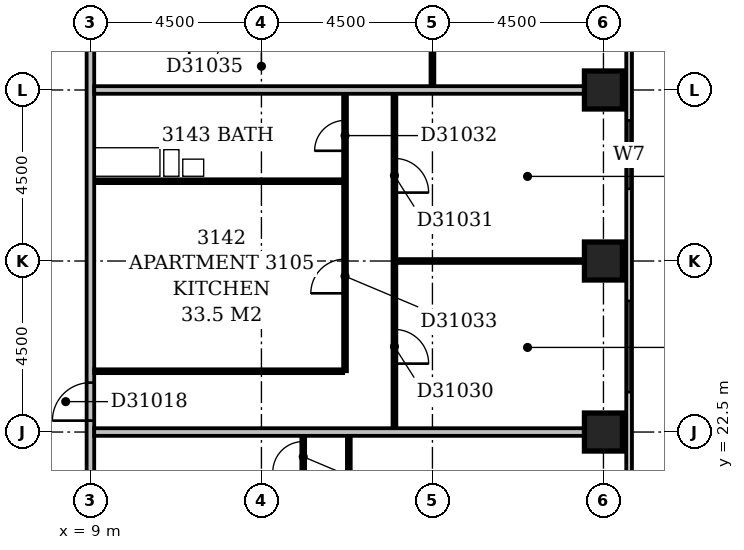
"""IFC4 building model, lengths in metres.
Left out: names, types, materials, properties, quantities, classifications, styles, units other than length and angle.
Written with IfcOpenShell. Run it as: python <this file> out.ifc"""

import sys

from ifc_helpers import new_model, si_unit, direction, frame, frame_2d, origin, origin_2d, place, context, subcontext, project, spatial, rectangle, extrude, element, fill, save


model = new_model("IFC4")
c1 = context("Model", 3, precision=1e-05, world=origin(), true_north=direction((0.0, 1.0)))
c2 = subcontext(c1, "Body", "Model", "MODEL_VIEW")
j1 = project(units=[si_unit("LENGTHUNIT", "METRE"), si_unit("PLANEANGLEUNIT", "RADIAN")], contexts=[c1])
p1 = place(None, origin())
s1 = spatial("IfcSite", under=j1, at=p1, CompositionType="ELEMENT")
p2 = place(p1, origin())
s2 = spatial("IfcBuilding", under=s1, at=p2, CompositionType="ELEMENT")
p3 = place(p2, frame((0.0, 0.0, 126.8)))
s3 = spatial("IfcBuildingStorey", under=s2, at=p3, CompositionType="ELEMENT", Elevation=126.8)
for number, where, z_axis, x_axis in (
    (1, (22.5, 22.5, -0.3), (0.0, 0.0, 1.0), (1.0, 0.0, 0.0)),
    (2, (22.5, 27.0, -0.3), (0.0, 0.0, 1.0), (1.0, 0.0, 0.0)),
    (3, (22.5, 31.5, -0.3), (0.0, 0.0, 1.0), (1.0, 0.0, 0.0)),
):
    element("IfcColumn", number, at=place(p3, frame(where, z_axis=z_axis, x_axis=x_axis)), inside=s3, PredefinedType="COLUMN", context=c2, shape_type="SweptSolid", body=[
        extrude(rectangle(XDim=1.0, YDim=1.0, at=origin_2d()), origin(), (0.0, 0.0, 1.0), 3.6),
    ])
p4 = place(p3, frame((23.175, 17.4, 0.0), z_axis=(0.0, 0.0, 1.0), x_axis=(0.0, 1.0, 0.0)))
e4 = element("IfcWall", 4, at=p4, inside=s3, PredefinedType="STANDARD", context=c2, shape_type="SweptSolid", body=[
    extrude(rectangle(XDim=17.85, YDim=0.15, at=frame_2d((8.925, 0.0))), origin(), (0.0, 0.0, 1.0), 2.7),
])
p5 = place(p4, frame((1.65, 0.0, 0.6)))
e5 = element("IfcOpeningElement", 5, at=p5, cuts=e4, PredefinedType="OPENING", context=c2, shape_type="SweptSolid", body=[
    extrude(rectangle(XDim=2.4, YDim=1.8, at=frame_2d((1.2, 0.9))), frame((0.0, 0.087, 0.0), z_axis=(0.0, -1.0, 0.0), x_axis=(1.0, 0.0, 0.0)), (0.0, 0.0, 1.0), 0.174),
])
p6 = place(p4, frame((6.15, 0.0, 0.6)))
e6 = element("IfcOpeningElement", 6, at=p6, cuts=e4, PredefinedType="OPENING", context=c2, shape_type="SweptSolid", body=[
    extrude(rectangle(XDim=2.4, YDim=1.8, at=frame_2d((1.2, 0.9))), frame((0.0, 0.087, 0.0), z_axis=(0.0, -1.0, 0.0), x_axis=(1.0, 0.0, 0.0)), (0.0, 0.0, 1.0), 0.174),
])
p7 = place(p4, frame((11.498, 0.0, 0.6)))
e7 = element("IfcOpeningElement", 7, at=p7, cuts=e4, PredefinedType="OPENING", context=c2, shape_type="SweptSolid", body=[
    extrude(rectangle(XDim=1.8, YDim=1.8, at=frame_2d((0.9, 0.9))), frame((0.0, 0.087, 0.0), z_axis=(0.0, -1.0, 0.0), x_axis=(1.0, 0.0, 0.0)), (0.0, 0.0, 1.0), 0.174),
])
p8 = place(p4, frame((15.15, 0.0, 0.6)))
e8 = element("IfcOpeningElement", 8, at=p8, cuts=e4, PredefinedType="OPENING", context=c2, shape_type="SweptSolid", body=[
    extrude(rectangle(XDim=2.4, YDim=1.8, at=frame_2d((1.2, 0.9))), frame((0.0, 0.087, 0.0), z_axis=(0.0, -1.0, 0.0), x_axis=(1.0, 0.0, 0.0)), (0.0, 0.0, 1.0), 0.174),
])
p9 = place(p3, frame((9.0, 5.0, 0.0), z_axis=(0.0, 0.0, 1.0), x_axis=(0.0, 1.0, 0.0)))
e9 = element("IfcWall", 9, at=p9, inside=s3, PredefinedType="PARTITIONING", context=c2, shape_type="SweptSolid", body=[
    extrude(rectangle(XDim=27.75, YDim=0.2, at=frame_2d((13.875, 0.0))), origin(), (0.0, 0.0, 1.0), 3.3),
])
p10 = place(p9, frame((17.8, 0.0, 0.0)))
e10 = element("IfcOpeningElement", 10, at=p10, cuts=e9, PredefinedType="OPENING", context=c2, shape_type="SweptSolid", body=[
    extrude(rectangle(XDim=1.0, YDim=2.1, at=frame_2d((0.5, 1.05))), frame((0.0, 0.112, 0.0), z_axis=(0.0, -1.0, 0.0), x_axis=(1.0, 0.0, 0.0)), (0.0, 0.0, 1.0), 0.224),
])
p11 = place(p9, frame((14.95, 0.0, 0.0)))
e11 = element("IfcOpeningElement", 11, at=p11, cuts=e9, PredefinedType="OPENING", context=c2, shape_type="SweptSolid", body=[
    extrude(rectangle(XDim=1.0, YDim=2.1, at=frame_2d((0.5, 1.05))), frame((0.0, 0.112, 0.0), z_axis=(0.0, -1.0, 0.0), x_axis=(1.0, 0.0, 0.0)), (0.0, 0.0, 1.0), 0.224),
])
p12 = place(p9, frame((9.3, 0.0, 0.0)))
e12 = element("IfcOpeningElement", 12, at=p12, cuts=e9, PredefinedType="OPENING", context=c2, shape_type="SweptSolid", body=[
    extrude(rectangle(XDim=1.0, YDim=2.1, at=frame_2d((0.5, 1.05))), frame((0.0, 0.112, 0.0), z_axis=(0.0, -1.0, 0.0), x_axis=(1.0, 0.0, 0.0)), (0.0, 0.0, 1.0), 0.224),
])
p13 = place(p9, frame((1.5, 0.0, 0.0)))
e13 = element("IfcOpeningElement", 13, at=p13, cuts=e9, PredefinedType="OPENING", context=c2, shape_type="SweptSolid", body=[
    extrude(rectangle(XDim=0.9, YDim=2.1, at=frame_2d((0.45, 1.05))), frame((0.0, 0.112, 0.0), z_axis=(0.0, -1.0, 0.0), x_axis=(1.0, 0.0, 0.0)), (0.0, 0.0, 1.0), 0.224),
])
p14 = place(p3, frame((15.8, 18.1, 0.0), z_axis=(0.0, 0.0, 1.0), x_axis=(0.0, 1.0, 0.0)))
e14 = element("IfcWall", 14, at=p14, inside=s3, PredefinedType="PARTITIONING", context=c2, shape_type="SweptSolid", body=[
    extrude(rectangle(XDim=4.3, YDim=0.1, at=frame_2d((2.15, 0.0))), origin(), (0.0, 0.0, 1.0), 3.3),
])
p15 = place(p14, frame((1.7, 0.0, 0.0)))
e15 = element("IfcOpeningElement", 15, at=p15, cuts=e14, PredefinedType="OPENING", context=c2, shape_type="SweptSolid", body=[
    extrude(rectangle(XDim=0.9, YDim=2.1, at=frame_2d((0.45, 1.05))), frame((0.0, 0.062, 0.0), z_axis=(0.0, -1.0, 0.0), x_axis=(1.0, 0.0, 0.0)), (0.0, 0.0, 1.0), 0.124),
])
p16 = place(p3, frame((14.6, 21.2, 0.0), z_axis=(0.0, 0.0, 1.0), x_axis=(0.0, 1.0, 0.0)))
e16 = element("IfcWall", 16, at=p16, inside=s3, PredefinedType="PARTITIONING", context=c2, shape_type="SweptSolid", body=[
    extrude(rectangle(XDim=1.2, YDim=0.1, at=frame_2d((0.6, 0.0))), origin(), (0.0, 0.0, 1.0), 3.3),
])
p17 = place(p16, frame((0.25, 0.0, 0.0)))
e17 = element("IfcOpeningElement", 17, at=p17, cuts=e16, PredefinedType="OPENING", context=c2, shape_type="SweptSolid", body=[
    extrude(rectangle(XDim=0.8, YDim=2.1, at=frame_2d((0.4, 1.05))), frame((0.0, 0.062, 0.0), z_axis=(0.0, -1.0, 0.0), x_axis=(1.0, 0.0, 0.0)), (0.0, 0.0, 1.0), 0.124),
])
p18 = place(p3, frame((9.1, 22.5, 0.0), z_axis=(0.0, 0.0, 1.0), x_axis=(1.0, 0.0, 0.0)))
e18 = element("IfcWall", 18, at=p18, inside=s3, PredefinedType="PARTITIONING", context=c2, shape_type="SweptSolid", body=[
    extrude(rectangle(XDim=12.9, YDim=0.2, at=frame_2d((6.45, 0.0))), origin(), (0.0, 0.0, 1.0), 3.3),
])
p19 = place(p3, frame((17.0, 22.6, 0.0), z_axis=(0.0, 0.0, 1.0), x_axis=(0.0, 1.0, 0.0)))
e19 = element("IfcWall", 19, at=p19, inside=s3, PredefinedType="PARTITIONING", context=c2, shape_type="SweptSolid", body=[
    extrude(rectangle(XDim=8.8, YDim=0.1, at=frame_2d((4.4, 0.0))), origin(), (0.0, 0.0, 1.0), 3.3),
])
p20 = place(p19, frame((1.7, 0.0, 0.0)))
e20 = element("IfcOpeningElement", 20, at=p20, cuts=e19, PredefinedType="OPENING", context=c2, shape_type="SweptSolid", body=[
    extrude(rectangle(XDim=0.9, YDim=2.1, at=frame_2d((0.45, 1.05))), frame((0.0, 0.062, 0.0), z_axis=(0.0, -1.0, 0.0), x_axis=(1.0, 0.0, 0.0)), (0.0, 0.0, 1.0), 0.124),
])
p21 = place(p19, frame((6.2, 0.0, 0.0)))
e21 = element("IfcOpeningElement", 21, at=p21, cuts=e19, PredefinedType="OPENING", context=c2, shape_type="SweptSolid", body=[
    extrude(rectangle(XDim=0.9, YDim=2.1, at=frame_2d((0.45, 1.05))), frame((0.0, 0.062, 0.0), z_axis=(0.0, -1.0, 0.0), x_axis=(1.0, 0.0, 0.0)), (0.0, 0.0, 1.0), 0.124),
])
p22 = place(p3, frame((9.1, 24.1, 0.0), z_axis=(0.0, 0.0, 1.0), x_axis=(1.0, 0.0, 0.0)))
e22 = element("IfcWall", 22, at=p22, inside=s3, PredefinedType="PARTITIONING", context=c2, shape_type="SweptSolid", body=[
    extrude(rectangle(XDim=6.55, YDim=0.1, at=frame_2d((3.275, 0.0))), origin(), (0.0, 0.0, 1.0), 3.3),
])
p23 = place(p3, frame((15.7, 24.1, 0.0), z_axis=(0.0, 0.0, 1.0), x_axis=(0.0, 1.0, 0.0)))
e23 = element("IfcWall", 23, at=p23, inside=s3, PredefinedType="PARTITIONING", context=c2, shape_type="SweptSolid", body=[
    extrude(rectangle(XDim=7.3, YDim=0.1, at=frame_2d((3.65, 0.0))), origin(), (0.0, 0.0, 1.0), 3.3),
])
p24 = place(p23, frame((5.8, 0.0, 0.0)))
e24 = element("IfcOpeningElement", 24, at=p24, cuts=e23, PredefinedType="OPENING", context=c2, shape_type="SweptSolid", body=[
    extrude(rectangle(XDim=0.8, YDim=2.1, at=frame_2d((0.4, 1.05))), frame((0.0, 0.062, 0.0), z_axis=(0.0, -1.0, 0.0), x_axis=(1.0, 0.0, 0.0)), (0.0, 0.0, 1.0), 0.124),
])
p25 = place(p23, frame((2.05, 0.0, 0.0)))
e25 = element("IfcOpeningElement", 25, at=p25, cuts=e23, PredefinedType="OPENING", context=c2, shape_type="SweptSolid", body=[
    extrude(rectangle(XDim=0.9, YDim=2.1, at=frame_2d((0.45, 1.05))), frame((0.0, 0.062, 0.0), z_axis=(0.0, -1.0, 0.0), x_axis=(1.0, 0.0, 0.0)), (0.0, 0.0, 1.0), 0.124),
])
p26 = place(p3, frame((17.05, 27.0, 0.0), z_axis=(0.0, 0.0, 1.0), x_axis=(1.0, 0.0, 0.0)))
e26 = element("IfcWall", 26, at=p26, inside=s3, PredefinedType="PARTITIONING", context=c2, shape_type="SweptSolid", body=[
    extrude(rectangle(XDim=4.95, YDim=0.1, at=frame_2d((2.475, 0.0))), origin(), (0.0, 0.0, 1.0), 2.7),
])
p27 = place(p3, frame((9.1, 29.1, 0.0), z_axis=(0.0, 0.0, 1.0), x_axis=(1.0, 0.0, 0.0)))
e27 = element("IfcWall", 27, at=p27, inside=s3, PredefinedType="PLUMBINGWALL", context=c2, shape_type="SweptSolid", body=[
    extrude(rectangle(XDim=6.55, YDim=0.1, at=frame_2d((3.275, 0.0))), origin(), (0.0, 0.0, 1.0), 3.3),
])
p28 = place(p3, frame((9.1, 31.5, 0.0), z_axis=(0.0, 0.0, 1.0), x_axis=(1.0, 0.0, 0.0)))
e28 = element("IfcWall", 28, at=p28, inside=s3, PredefinedType="PARTITIONING", context=c2, shape_type="SweptSolid", body=[
    extrude(rectangle(XDim=12.9, YDim=0.2, at=frame_2d((6.45, 0.0))), origin(), (0.0, 0.0, 1.0), 3.3),
])
p29 = place(p3, frame((18.0, 31.6, 0.0), z_axis=(0.0, 0.0, 1.0), x_axis=(0.0, 1.0, 0.0)))
e29 = element("IfcWall", 29, at=p29, inside=s3, PredefinedType="PARTITIONING", context=c2, shape_type="SweptSolid", body=[
    extrude(rectangle(XDim=4.3, YDim=0.1, at=frame_2d((2.15, 0.0))), origin(), (0.0, 0.0, 1.0), 3.3),
])
p30 = place(p29, frame((1.7, 0.0, 0.0)))
e30 = element("IfcOpeningElement", 30, at=p30, cuts=e29, PredefinedType="OPENING", context=c2, shape_type="SweptSolid", body=[
    extrude(rectangle(XDim=0.9, YDim=2.1, at=frame_2d((0.45, 1.05))), frame((0.0, 0.062, 0.0), z_axis=(0.0, -1.0, 0.0), x_axis=(1.0, 0.0, 0.0)), (0.0, 0.0, 1.0), 0.124),
])
p31 = place(p6, origin())
e31 = element("IfcWindow", 31, at=p31, inside=s3, PartitioningType="SINGLE_PANEL", PredefinedType="WINDOW", context=c2, shape_type="SweptSolid", body=[
    extrude(rectangle(XDim=2.4, YDim=1.8, at=frame_2d((1.2, 0.9))), frame((0.0, 0.03, 0.0), z_axis=(0.0, -1.0, 0.0), x_axis=(1.0, 0.0, 0.0)), (0.0, 0.0, 1.0), 0.06),
])
fill(e6, e31)
p32 = place(p7, origin())
e32 = element("IfcWindow", 32, at=p32, inside=s3, PartitioningType="SINGLE_PANEL", PredefinedType="WINDOW", context=c2, shape_type="SweptSolid", body=[
    extrude(rectangle(XDim=1.8, YDim=1.8, at=frame_2d((0.9, 0.9))), frame((0.0, 0.03, 0.0), z_axis=(0.0, -1.0, 0.0), x_axis=(1.0, 0.0, 0.0)), (0.0, 0.0, 1.0), 0.06),
])
fill(e7, e32)
p33 = place(p10, origin())
e33 = element("IfcDoor", 33, at=p33, inside=s3, OperationType="SINGLE_SWING_LEFT", PredefinedType="DOOR", context=c2, shape_type="SweptSolid", body=[
    extrude(rectangle(XDim=1.0, YDim=2.1, at=frame_2d((0.5, 1.05))), frame((0.0, 0.025, 0.0), z_axis=(0.0, -1.0, 0.0), x_axis=(1.0, 0.0, 0.0)), (0.0, 0.0, 1.0), 0.05),
])
fill(e10, e33)
p34 = place(p17, origin())
e34 = element("IfcDoor", 34, at=p34, inside=s3, OperationType="SINGLE_SWING_LEFT", PredefinedType="DOOR", context=c2, shape_type="SweptSolid", body=[
    extrude(rectangle(XDim=0.8, YDim=2.1, at=frame_2d((0.4, 1.05))), frame((0.0, 0.025, 0.0), z_axis=(0.0, -1.0, 0.0), x_axis=(1.0, 0.0, 0.0)), (0.0, 0.0, 1.0), 0.05),
])
fill(e17, e34)
p35 = place(p20, frame((0.9, 0.0, 0.0), z_axis=(0.0, 0.0, 1.0), x_axis=(-1.0, 0.0, 0.0)))
e35 = element("IfcDoor", 35, at=p35, inside=s3, OperationType="SINGLE_SWING_RIGHT", PredefinedType="DOOR", context=c2, shape_type="SweptSolid", body=[
    extrude(rectangle(XDim=0.9, YDim=2.1, at=frame_2d((0.45, 1.05))), frame((0.0, 0.025, 0.0), z_axis=(0.0, -1.0, 0.0), x_axis=(1.0, 0.0, 0.0)), (0.0, 0.0, 1.0), 0.05),
])
fill(e20, e35)
p36 = place(p21, frame((0.9, 0.0, 0.0), z_axis=(0.0, 0.0, 1.0), x_axis=(-1.0, 0.0, 0.0)))
e36 = element("IfcDoor", 36, at=p36, inside=s3, OperationType="SINGLE_SWING_RIGHT", PredefinedType="DOOR", context=c2, shape_type="SweptSolid", body=[
    extrude(rectangle(XDim=0.9, YDim=2.1, at=frame_2d((0.45, 1.05))), frame((0.0, 0.025, 0.0), z_axis=(0.0, -1.0, 0.0), x_axis=(1.0, 0.0, 0.0)), (0.0, 0.0, 1.0), 0.05),
])
fill(e21, e36)
p37 = place(p24, origin())
e37 = element("IfcDoor", 37, at=p37, inside=s3, OperationType="SINGLE_SWING_LEFT", PredefinedType="DOOR", context=c2, shape_type="SweptSolid", body=[
    extrude(rectangle(XDim=0.8, YDim=2.1, at=frame_2d((0.4, 1.05))), frame((0.0, 0.025, 0.0), z_axis=(0.0, -1.0, 0.0), x_axis=(1.0, 0.0, 0.0)), (0.0, 0.0, 1.0), 0.05),
])
fill(e24, e37)
p38 = place(p25, origin())
e38 = element("IfcDoor", 38, at=p38, inside=s3, OperationType="SINGLE_SWING_LEFT", PredefinedType="DOOR", context=c2, shape_type="SweptSolid", body=[
    extrude(rectangle(XDim=0.9, YDim=2.1, at=frame_2d((0.45, 1.05))), frame((0.0, 0.025, 0.0), z_axis=(0.0, -1.0, 0.0), x_axis=(1.0, 0.0, 0.0)), (0.0, 0.0, 1.0), 0.05),
])
fill(e25, e38)
save(model, sys.argv[1])
